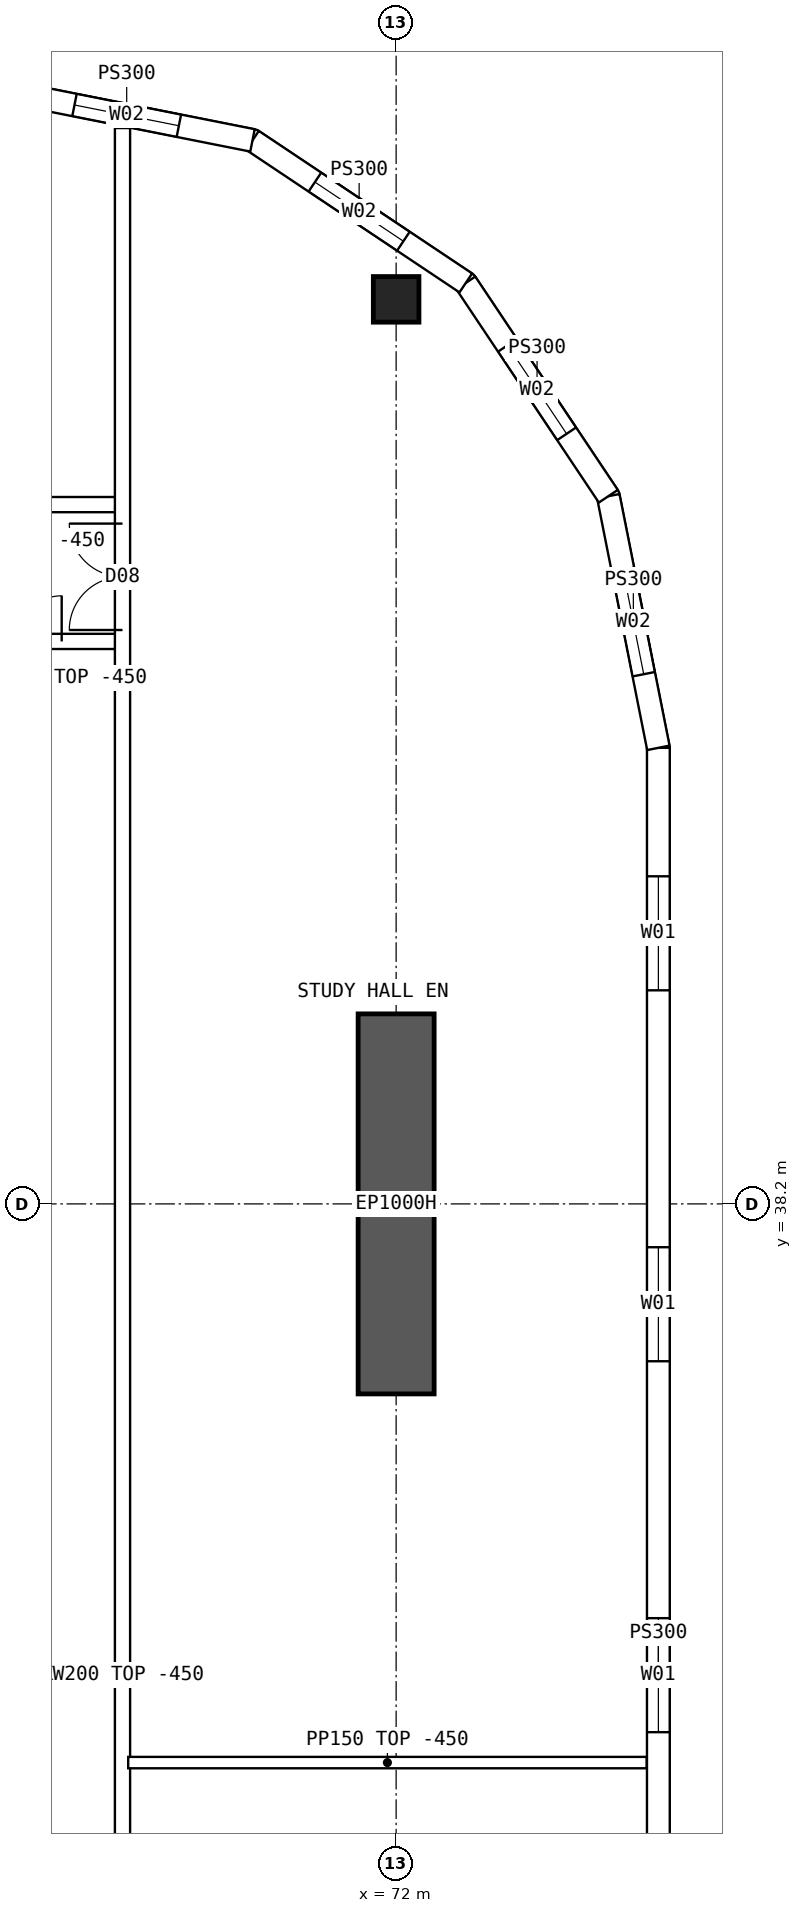
"""IFC4 building model, lengths in metres.
Left out: names, types, materials, properties, quantities, classifications, styles, units other than length and angle.
Written with IfcOpenShell. Run it as: python <this file> out.ifc"""

import sys

from ifc_helpers import new_model, si_unit, direction, frame, frame_2d, origin, origin_2d, place, context, subcontext, project, spatial, polyline, rectangle, hollow_rectangle, outline, extrude, element, fill, save


model = new_model("IFC4")
c1 = context("Model", 3, precision=1e-05, world=origin(), true_north=direction((0.0, 1.0)))
c2 = subcontext(c1, "Body", "Model", "MODEL_VIEW")
j1 = project(units=[si_unit("LENGTHUNIT", "METRE"), si_unit("PLANEANGLEUNIT", "RADIAN")], contexts=[c1])
p1 = place(None, origin())
s1 = spatial("IfcSite", under=j1, at=p1, CompositionType="ELEMENT")
p2 = place(p1, origin())
s2 = spatial("IfcBuilding", under=s1, at=p2, CompositionType="ELEMENT")
p3 = place(p2, frame((0.0, 0.0, 242.8)))
s3 = spatial("IfcBuildingStorey", under=s2, at=p3, CompositionType="ELEMENT", Elevation=242.8)
p4 = place(p3, frame((72.0, 50.1, 0.0), z_axis=(0.0, 0.0, 1.0), x_axis=(1.0, 0.0, 0.0)))
e1 = element("IfcColumn", 1, at=p4, inside=s3, PredefinedType="COLUMN", context=c2, shape_type="SweptSolid", body=[
    extrude(hollow_rectangle(XDim=0.6, YDim=0.6, WallThickness=0.06, at=origin_2d()), origin(), (0.0, 0.0, 1.0), 3.75),
])
p5 = place(p3, frame((72.0, 35.7, 0.0), z_axis=(0.0, 0.0, 1.0), x_axis=(0.0, 1.0, 0.0)))
e2 = element("IfcWall", 2, at=p5, inside=s3, PredefinedType="SHEAR", context=c2, shape_type="SweptSolid", body=[
    extrude(rectangle(XDim=5.0, YDim=1.0, at=frame_2d((2.5, 0.0))), origin(), (0.0, 0.0, 1.0), 3.75),
])
p6 = place(p3, frame((75.45, 19.8, 0.0), z_axis=(0.0, 0.0, 1.0), x_axis=(0.0, 1.0, 0.0)))
e3 = element("IfcWall", 3, at=p6, inside=s3, PredefinedType="SOLIDWALL", context=c2, shape_type="SweptSolid", body=[
    extrude(outline(polyline([(-0.015, -0.15), (24.415, -0.15), (24.385, 0.15), (0.015, 0.15), (-0.015, -0.15)])), origin(), (0.0, 0.0, 1.0), 3.3),
])
p7 = place(p6, frame((1.69, 0.0, 0.9)))
e4 = element("IfcOpeningElement", 4, at=p7, cuts=e3, PredefinedType="OPENING", context=c2, shape_type="SweptSolid", body=[
    extrude(rectangle(XDim=1.5, YDim=2.0, at=frame_2d((0.75, 1.0))), frame((0.0, 0.16, 0.0), z_axis=(0.0, -1.0, 0.0), x_axis=(1.0, 0.0, 0.0)), (0.0, 0.0, 1.0), 0.32),
])
p8 = place(p6, frame((6.57, 0.0, 0.9)))
e5 = element("IfcOpeningElement", 5, at=p8, cuts=e3, PredefinedType="OPENING", context=c2, shape_type="SweptSolid", body=[
    extrude(rectangle(XDim=1.5, YDim=2.0, at=frame_2d((0.75, 1.0))), frame((0.0, 0.16, 0.0), z_axis=(0.0, -1.0, 0.0), x_axis=(1.0, 0.0, 0.0)), (0.0, 0.0, 1.0), 0.32),
])
p9 = place(p6, frame((11.45, 0.0, 0.9)))
e6 = element("IfcOpeningElement", 6, at=p9, cuts=e3, PredefinedType="OPENING", context=c2, shape_type="SweptSolid", body=[
    extrude(rectangle(XDim=1.5, YDim=2.0, at=frame_2d((0.75, 1.0))), frame((0.0, 0.16, 0.0), z_axis=(0.0, -1.0, 0.0), x_axis=(1.0, 0.0, 0.0)), (0.0, 0.0, 1.0), 0.32),
])
p10 = place(p6, frame((16.33, 0.0, 0.9)))
e7 = element("IfcOpeningElement", 7, at=p10, cuts=e3, PredefinedType="OPENING", context=c2, shape_type="SweptSolid", body=[
    extrude(rectangle(XDim=1.5, YDim=2.0, at=frame_2d((0.75, 1.0))), frame((0.0, 0.16, 0.0), z_axis=(0.0, -1.0, 0.0), x_axis=(1.0, 0.0, 0.0)), (0.0, 0.0, 1.0), 0.32),
])
p11 = place(p6, frame((21.21, 0.0, 0.9)))
e8 = element("IfcOpeningElement", 8, at=p11, cuts=e3, PredefinedType="OPENING", context=c2, shape_type="SweptSolid", body=[
    extrude(rectangle(XDim=1.5, YDim=2.0, at=frame_2d((0.75, 1.0))), frame((0.0, 0.16, 0.0), z_axis=(0.0, -1.0, 0.0), x_axis=(1.0, 0.0, 0.0)), (0.0, 0.0, 1.0), 0.32),
])
p12 = place(p3, frame((75.45, 44.2, 0.0), z_axis=(0.0, 0.0, 1.0), x_axis=(-0.19508664885, 0.980786011034, 0.0)))
e9 = element("IfcWall", 9, at=p12, inside=s3, PredefinedType="SOLIDWALL", context=c2, shape_type="SweptSolid", body=[
    extrude(outline(polyline([(-0.015, -0.15), (3.405, -0.15), (3.345, 0.15), (0.015, 0.15), (-0.015, -0.15)])), origin(), (0.0, 0.0, 1.0), 3.3),
])
p13 = place(p12, frame((0.988, 0.0, 0.9)))
e10 = element("IfcOpeningElement", 10, at=p13, cuts=e9, PredefinedType="OPENING", context=c2, shape_type="SweptSolid", body=[
    extrude(rectangle(XDim=1.4, YDim=1.8, at=frame_2d((0.7, 0.9))), frame((0.0, 0.16, 0.0), z_axis=(0.0, -1.0, 0.0), x_axis=(1.0, 0.0, 0.0)), (0.0, 0.0, 1.0), 0.32),
])
p14 = place(p3, frame((74.792, 47.51, 0.0), z_axis=(0.0, 0.0, 1.0), x_axis=(-0.555567969291, 0.831471124873, 0.0)))
e11 = element("IfcWall", 11, at=p14, inside=s3, PredefinedType="SOLIDWALL", context=c2, shape_type="SweptSolid", body=[
    extrude(outline(polyline([(-0.03, -0.15), (3.405, -0.15), (3.345, 0.15), (0.03, 0.15), (-0.03, -0.15)])), origin(), (0.0, 0.0, 1.0), 3.3),
])
p15 = place(p14, frame((0.988, 0.0, 0.9)))
e12 = element("IfcOpeningElement", 12, at=p15, cuts=e11, PredefinedType="OPENING", context=c2, shape_type="SweptSolid", body=[
    extrude(rectangle(XDim=1.4, YDim=1.8, at=frame_2d((0.7, 0.9))), frame((0.0, 0.16, 0.0), z_axis=(0.0, -1.0, 0.0), x_axis=(1.0, 0.0, 0.0)), (0.0, 0.0, 1.0), 0.32),
])
p16 = place(p3, frame((72.917, 50.316, 0.0), z_axis=(0.0, 0.0, 1.0), x_axis=(-0.831460037396, 0.555584562613, 0.0)))
e13 = element("IfcWall", 13, at=p16, inside=s3, PredefinedType="SOLIDWALL", context=c2, shape_type="SweptSolid", body=[
    extrude(outline(polyline([(-0.03, -0.15), (3.405, -0.15), (3.345, 0.15), (0.03, 0.15), (-0.03, -0.15)])), origin(), (0.0, 0.0, 1.0), 3.3),
])
p17 = place(p16, frame((0.988, 0.0, 0.9)))
e14 = element("IfcOpeningElement", 14, at=p17, cuts=e13, PredefinedType="OPENING", context=c2, shape_type="SweptSolid", body=[
    extrude(rectangle(XDim=1.4, YDim=1.8, at=frame_2d((0.7, 0.9))), frame((0.0, 0.16, 0.0), z_axis=(0.0, -1.0, 0.0), x_axis=(1.0, 0.0, 0.0)), (0.0, 0.0, 1.0), 0.32),
])
p18 = place(p3, frame((70.11, 52.192, 0.0), z_axis=(0.0, 0.0, 1.0), x_axis=(-0.98078325777, 0.195100490205, 0.0)))
e15 = element("IfcWall", 15, at=p18, inside=s3, PredefinedType="SOLIDWALL", context=c2, shape_type="SweptSolid", body=[
    extrude(outline(polyline([(-0.03, -0.15), (3.405, -0.15), (3.345, 0.15), (0.03, 0.15), (-0.03, -0.15)])), origin(), (0.0, 0.0, 1.0), 3.3),
])
p19 = place(p18, frame((0.988, 0.0, 0.9)))
e16 = element("IfcOpeningElement", 16, at=p19, cuts=e15, PredefinedType="OPENING", context=c2, shape_type="SweptSolid", body=[
    extrude(rectangle(XDim=1.4, YDim=1.8, at=frame_2d((0.7, 0.9))), frame((0.0, 0.16, 0.0), z_axis=(0.0, -1.0, 0.0), x_axis=(1.0, 0.0, 0.0)), (0.0, 0.0, 1.0), 0.32),
])
p20 = place(p3, frame((66.35, 47.4, 0.0), z_axis=(0.0, 0.0, 1.0), x_axis=(1.0, 0.0, 0.0)))
e17 = element("IfcWall", 17, at=p20, inside=s3, PredefinedType="SOLIDWALL", context=c2, shape_type="SweptSolid", body=[
    extrude(rectangle(XDim=2.05, YDim=0.2, at=frame_2d((1.025, 0.0))), origin(), (0.0, 0.0, 1.0), 3.3),
])
p21 = place(p20, frame((0.2, 0.0, 0.0)))
e18 = element("IfcOpeningElement", 18, at=p21, cuts=e17, PredefinedType="OPENING", context=c2, shape_type="SweptSolid", body=[
    extrude(rectangle(XDim=0.9, YDim=2.1, at=frame_2d((0.45, 1.05))), frame((0.0, 0.11, 0.0), z_axis=(0.0, -1.0, 0.0), x_axis=(1.0, 0.0, 0.0)), (0.0, 0.0, 1.0), 0.22),
])
p22 = place(p3, frame((66.35, 45.6, 0.0), z_axis=(0.0, 0.0, 1.0), x_axis=(1.0, 0.0, 0.0)))
e19 = element("IfcWall", 19, at=p22, inside=s3, PredefinedType="SOLIDWALL", context=c2, shape_type="SweptSolid", body=[
    extrude(rectangle(XDim=2.05, YDim=0.2, at=frame_2d((1.025, 0.0))), origin(), (0.0, 0.0, 1.0), 3.3),
])
p23 = place(p22, frame((0.05, 0.0, 0.0)))
e20 = element("IfcOpeningElement", 20, at=p23, cuts=e19, PredefinedType="OPENING", context=c2, shape_type="SweptSolid", body=[
    extrude(rectangle(XDim=1.2, YDim=2.1, at=frame_2d((0.6, 1.05))), frame((0.0, 0.11, 0.0), z_axis=(0.0, -1.0, 0.0), x_axis=(1.0, 0.0, 0.0)), (0.0, 0.0, 1.0), 0.22),
])
p24 = place(p3, frame((68.475, 30.85, 0.0), z_axis=(0.0, 0.0, 1.0), x_axis=(1.0, 0.0, 0.0)))
e21 = element("IfcWall", 21, at=p24, inside=s3, PredefinedType="PARTITIONING", context=c2, shape_type="SweptSolid", body=[
    extrude(outline(polyline([(0.0, 0.0), (6.82, 0.0), (6.82, 3.3), (3.827, 3.3), (3.825, 2.85), (3.227, 2.85), (3.225, 3.3), (0.0, 3.3), (0.0, 0.0)])), frame((0.0, 0.075, 0.0), z_axis=(0.0, -1.0, 0.0), x_axis=(1.0, 0.0, 0.0)), (0.0, 0.0, 1.0), 0.15),
])
p25 = place(p3, frame((68.4, 11.646, 0.0), z_axis=(0.0, 0.0, 1.0), x_axis=(0.0, 1.0, 0.0)))
e22 = element("IfcWall", 22, at=p25, inside=s3, PredefinedType="SOLIDWALL", context=c2, shape_type="SweptSolid", body=[
    extrude(rectangle(XDim=40.708, YDim=0.2, at=frame_2d((20.354, 0.0))), origin(), (0.0, 0.0, 1.0), 3.3),
])
p26 = place(p25, frame((5.104, 0.0, 0.0)))
e23 = element("IfcOpeningElement", 23, at=p26, cuts=e22, PredefinedType="OPENING", context=c2, shape_type="SweptSolid", body=[
    extrude(rectangle(XDim=1.4, YDim=2.1, at=frame_2d((0.7, 1.05))), frame((0.0, 0.11, 0.0), z_axis=(0.0, -1.0, 0.0), x_axis=(1.0, 0.0, 0.0)), (0.0, 0.0, 1.0), 0.22),
])
p27 = place(p25, frame((34.104, 0.0, 0.0)))
e24 = element("IfcOpeningElement", 24, at=p27, cuts=e22, PredefinedType="OPENING", context=c2, shape_type="SweptSolid", body=[
    extrude(rectangle(XDim=1.4, YDim=2.1, at=frame_2d((0.7, 1.05))), frame((0.0, 0.11, 0.0), z_axis=(0.0, -1.0, 0.0), x_axis=(1.0, 0.0, 0.0)), (0.0, 0.0, 1.0), 0.22),
])
p28 = place(p9, origin())
e25 = element("IfcWindow", 25, at=p28, inside=s3, PartitioningType="SINGLE_PANEL", PredefinedType="WINDOW", context=c2, shape_type="SweptSolid", body=[
    extrude(rectangle(XDim=1.5, YDim=2.0, at=frame_2d((0.75, 1.0))), frame((0.0, 0.03, 0.0), z_axis=(0.0, -1.0, 0.0), x_axis=(1.0, 0.0, 0.0)), (0.0, 0.0, 1.0), 0.06),
])
fill(e6, e25)
p29 = place(p10, origin())
e26 = element("IfcWindow", 26, at=p29, inside=s3, PartitioningType="SINGLE_PANEL", PredefinedType="WINDOW", context=c2, shape_type="SweptSolid", body=[
    extrude(rectangle(XDim=1.5, YDim=2.0, at=frame_2d((0.75, 1.0))), frame((0.0, 0.03, 0.0), z_axis=(0.0, -1.0, 0.0), x_axis=(1.0, 0.0, 0.0)), (0.0, 0.0, 1.0), 0.06),
])
fill(e7, e26)
p30 = place(p11, origin())
e27 = element("IfcWindow", 27, at=p30, inside=s3, PartitioningType="SINGLE_PANEL", PredefinedType="WINDOW", context=c2, shape_type="SweptSolid", body=[
    extrude(rectangle(XDim=1.5, YDim=2.0, at=frame_2d((0.75, 1.0))), frame((0.0, 0.03, 0.0), z_axis=(0.0, -1.0, 0.0), x_axis=(1.0, 0.0, 0.0)), (0.0, 0.0, 1.0), 0.06),
])
fill(e8, e27)
p31 = place(p13, origin())
e28 = element("IfcWindow", 28, at=p31, inside=s3, PartitioningType="SINGLE_PANEL", PredefinedType="WINDOW", context=c2, shape_type="SweptSolid", body=[
    extrude(rectangle(XDim=1.4, YDim=1.8, at=frame_2d((0.7, 0.9))), frame((0.0, 0.03, 0.0), z_axis=(0.0, -1.0, 0.0), x_axis=(1.0, 0.0, 0.0)), (0.0, 0.0, 1.0), 0.06),
])
fill(e10, e28)
p32 = place(p15, origin())
e29 = element("IfcWindow", 29, at=p32, inside=s3, PartitioningType="SINGLE_PANEL", PredefinedType="WINDOW", context=c2, shape_type="SweptSolid", body=[
    extrude(rectangle(XDim=1.4, YDim=1.8, at=frame_2d((0.7, 0.9))), frame((0.0, 0.03, 0.0), z_axis=(0.0, -1.0, 0.0), x_axis=(1.0, 0.0, 0.0)), (0.0, 0.0, 1.0), 0.06),
])
fill(e12, e29)
p33 = place(p17, origin())
e30 = element("IfcWindow", 30, at=p33, inside=s3, PartitioningType="SINGLE_PANEL", PredefinedType="WINDOW", context=c2, shape_type="SweptSolid", body=[
    extrude(rectangle(XDim=1.4, YDim=1.8, at=frame_2d((0.7, 0.9))), frame((0.0, 0.03, 0.0), z_axis=(0.0, -1.0, 0.0), x_axis=(1.0, 0.0, 0.0)), (0.0, 0.0, 1.0), 0.06),
])
fill(e14, e30)
p34 = place(p19, origin())
e31 = element("IfcWindow", 31, at=p34, inside=s3, PartitioningType="SINGLE_PANEL", PredefinedType="WINDOW", context=c2, shape_type="SweptSolid", body=[
    extrude(rectangle(XDim=1.4, YDim=1.8, at=frame_2d((0.7, 0.9))), frame((0.0, 0.03, 0.0), z_axis=(0.0, -1.0, 0.0), x_axis=(1.0, 0.0, 0.0)), (0.0, 0.0, 1.0), 0.06),
])
fill(e16, e31)
p35 = place(p23, origin())
e32 = element("IfcDoor", 32, at=p35, inside=s3, OperationType="DOUBLE_DOOR_SINGLE_SWING", PredefinedType="DOOR", context=c2, shape_type="SweptSolid", body=[
    extrude(rectangle(XDim=1.2, YDim=2.1, at=frame_2d((0.6, 1.05))), frame((0.0, 0.025, 0.0), z_axis=(0.0, -1.0, 0.0), x_axis=(1.0, 0.0, 0.0)), (0.0, 0.0, 1.0), 0.05),
])
fill(e20, e32)
p36 = place(p27, origin())
e33 = element("IfcDoor", 33, at=p36, inside=s3, OperationType="DOUBLE_DOOR_SINGLE_SWING", PredefinedType="DOOR", context=c2, shape_type="SweptSolid", body=[
    extrude(rectangle(XDim=1.4, YDim=2.1, at=frame_2d((0.7, 1.05))), frame((0.0, 0.025, 0.0), z_axis=(0.0, -1.0, 0.0), x_axis=(1.0, 0.0, 0.0)), (0.0, 0.0, 1.0), 0.05),
])
fill(e24, e33)
save(model, sys.argv[1])
